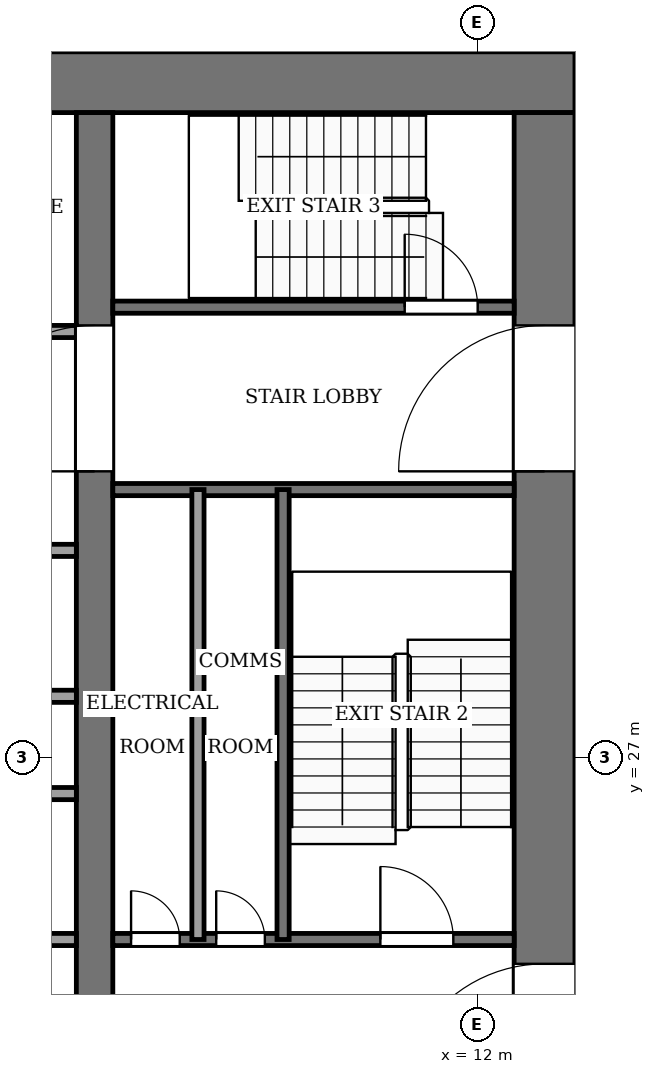
"""IFC4 building model, lengths in metres.
Left out: names, types, materials, properties, quantities, classifications, styles, units other than length and angle.
Written with IfcOpenShell. Run it as: python <this file> out.ifc"""

import sys

from ifc_helpers import new_model, si_unit, direction, frame, frame_2d, origin, place, context, subcontext, project, spatial, rectangle, extrude, element, fill, save


model = new_model("IFC4")
c1 = context("Model", 3, precision=1e-05, world=origin(), true_north=direction((0.0, 1.0)))
c2 = subcontext(c1, "Body", "Model", "MODEL_VIEW")
j1 = project(units=[si_unit("LENGTHUNIT", "METRE"), si_unit("PLANEANGLEUNIT", "RADIAN")], contexts=[c1])
p1 = place(None, origin())
s1 = spatial("IfcSite", under=j1, at=p1, CompositionType="ELEMENT")
p2 = place(p1, origin())
s2 = spatial("IfcBuilding", under=s1, at=p2, CompositionType="ELEMENT")
p3 = place(p2, frame((0.0, 0.0, 138.0)))
s3 = spatial("IfcBuildingStorey", under=s2, at=p3, CompositionType="ELEMENT", Elevation=138.0)
p4 = place(p3, frame((-13.6, 38.1, -0.13), z_axis=(0.0, 0.0, 1.0), x_axis=(1.0, 0.0, 0.0)))
e1 = element("IfcWall", 1, at=p4, inside=s3, PredefinedType="SHEAR", context=c2, shape_type="SweptSolid", body=[
    extrude(rectangle(XDim=27.2, YDim=1.0, at=frame_2d((13.6, 0.0))), origin(), (0.0, 0.0, 1.0), 4.0),
])
p5 = place(p3, frame((13.1, 18.4, -0.13), z_axis=(0.0, 0.0, 1.0), x_axis=(0.0, 1.0, 0.0)))
e2 = element("IfcWall", 2, at=p5, inside=s3, PredefinedType="SHEAR", context=c2, shape_type="SweptSolid", body=[
    extrude(rectangle(XDim=19.2, YDim=1.0, at=frame_2d((9.6, 0.0))), origin(), (0.0, 0.0, 1.0), 4.0),
])
p6 = place(p5, frame((2.8, 0.0, 0.13)))
e3 = element("IfcOpeningElement", 3, at=p6, cuts=e2, PredefinedType="OPENING", context=c2, shape_type="SweptSolid", body=[
    extrude(rectangle(XDim=2.4, YDim=2.4, at=frame_2d((1.2, 1.2))), frame((0.0, 0.51, 0.0), z_axis=(0.0, -1.0, 0.0), x_axis=(1.0, 0.0, 0.0)), (0.0, 0.0, 1.0), 1.02),
])
p7 = place(p5, frame((13.3, 0.0, 0.13)))
e4 = element("IfcOpeningElement", 4, at=p7, cuts=e2, PredefinedType="OPENING", context=c2, shape_type="SweptSolid", body=[
    extrude(rectangle(XDim=2.4, YDim=2.4, at=frame_2d((1.2, 1.2))), frame((0.0, 0.51, 0.0), z_axis=(0.0, -1.0, 0.0), x_axis=(1.0, 0.0, 0.0)), (0.0, 0.0, 1.0), 1.02),
])
p8 = place(p3, frame((5.7, 18.4, -0.13), z_axis=(0.0, 0.0, 1.0), x_axis=(0.0, 1.0, 0.0)))
e5 = element("IfcWall", 5, at=p8, inside=s3, PredefinedType="SHEAR", context=c2, shape_type="SweptSolid", body=[
    extrude(rectangle(XDim=19.2, YDim=0.6, at=frame_2d((9.6, 0.0))), origin(), (0.0, 0.0, 1.0), 4.0),
])
p9 = place(p8, frame((13.3, 0.0, 0.13)))
e6 = element("IfcOpeningElement", 6, at=p9, cuts=e5, PredefinedType="OPENING", context=c2, shape_type="SweptSolid", body=[
    extrude(rectangle(XDim=2.4, YDim=2.4, at=frame_2d((1.2, 1.2))), frame((0.0, 0.31, 0.0), z_axis=(0.0, -1.0, 0.0), x_axis=(1.0, 0.0, 0.0)), (0.0, 0.0, 1.0), 0.62),
])
p10 = place(p3, frame((-5.4, 24.0, 0.0), z_axis=(0.0, 0.0, 1.0), x_axis=(1.0, 0.0, 0.0)))
e7 = element("IfcWall", 7, at=p10, inside=s3, PredefinedType="PARTITIONING", context=c2, shape_type="SweptSolid", body=[
    extrude(rectangle(XDim=10.8, YDim=0.2, at=frame_2d((5.4, 0.0))), origin(), (0.0, 0.0, 1.0), 3.87),
])
p11 = place(p10, frame((0.75, 0.0, 0.0)))
e8 = element("IfcOpeningElement", 8, at=p11, cuts=e7, PredefinedType="OPENING", context=c2, shape_type="SweptSolid", body=[
    extrude(rectangle(XDim=1.2, YDim=2.2, at=frame_2d((0.6, 1.1))), frame((0.0, 0.11, 0.0), z_axis=(0.0, -1.0, 0.0), x_axis=(1.0, 0.0, 0.0)), (0.0, 0.0, 1.0), 0.22),
])
p12 = place(p10, frame((3.45, 0.0, 0.0)))
e9 = element("IfcOpeningElement", 9, at=p12, cuts=e7, PredefinedType="OPENING", context=c2, shape_type="SweptSolid", body=[
    extrude(rectangle(XDim=1.2, YDim=2.2, at=frame_2d((0.6, 1.1))), frame((0.0, 0.11, 0.0), z_axis=(0.0, -1.0, 0.0), x_axis=(1.0, 0.0, 0.0)), (0.0, 0.0, 1.0), 0.22),
])
p13 = place(p10, frame((6.15, 0.0, 0.0)))
e10 = element("IfcOpeningElement", 10, at=p13, cuts=e7, PredefinedType="OPENING", context=c2, shape_type="SweptSolid", body=[
    extrude(rectangle(XDim=1.2, YDim=2.2, at=frame_2d((0.6, 1.1))), frame((0.0, 0.11, 0.0), z_axis=(0.0, -1.0, 0.0), x_axis=(1.0, 0.0, 0.0)), (0.0, 0.0, 1.0), 0.22),
])
p14 = place(p10, frame((8.85, 0.0, 0.0)))
e11 = element("IfcOpeningElement", 11, at=p14, cuts=e7, PredefinedType="OPENING", context=c2, shape_type="SweptSolid", body=[
    extrude(rectangle(XDim=1.2, YDim=2.2, at=frame_2d((0.6, 1.1))), frame((0.0, 0.11, 0.0), z_axis=(0.0, -1.0, 0.0), x_axis=(1.0, 0.0, 0.0)), (0.0, 0.0, 1.0), 0.22),
])
p15 = place(p3, frame((6.0, 24.0, 0.0), z_axis=(0.0, 0.0, 1.0), x_axis=(1.0, 0.0, 0.0)))
e12 = element("IfcWall", 12, at=p15, inside=s3, PredefinedType="PARTITIONING", context=c2, shape_type="SweptSolid", body=[
    extrude(rectangle(XDim=6.6, YDim=0.2, at=frame_2d((3.3, 0.0))), origin(), (0.0, 0.0, 1.0), 3.87),
])
p16 = place(p15, frame((0.3, 0.0, 0.0)))
e13 = element("IfcOpeningElement", 13, at=p16, cuts=e12, PredefinedType="OPENING", context=c2, shape_type="SweptSolid", body=[
    extrude(rectangle(XDim=0.8, YDim=2.1, at=frame_2d((0.4, 1.05))), frame((0.0, 0.11, 0.0), z_axis=(0.0, -1.0, 0.0), x_axis=(1.0, 0.0, 0.0)), (0.0, 0.0, 1.0), 0.22),
])
p17 = place(p15, frame((1.7, 0.0, 0.0)))
e14 = element("IfcOpeningElement", 14, at=p17, cuts=e12, PredefinedType="OPENING", context=c2, shape_type="SweptSolid", body=[
    extrude(rectangle(XDim=0.8, YDim=2.1, at=frame_2d((0.4, 1.05))), frame((0.0, 0.11, 0.0), z_axis=(0.0, -1.0, 0.0), x_axis=(1.0, 0.0, 0.0)), (0.0, 0.0, 1.0), 0.22),
])
p18 = place(p15, frame((4.4, 0.0, 0.0)))
e15 = element("IfcOpeningElement", 15, at=p18, cuts=e12, PredefinedType="OPENING", context=c2, shape_type="SweptSolid", body=[
    extrude(rectangle(XDim=1.2, YDim=2.2, at=frame_2d((0.6, 1.1))), frame((0.0, 0.11, 0.0), z_axis=(0.0, -1.0, 0.0), x_axis=(1.0, 0.0, 0.0)), (0.0, 0.0, 1.0), 0.22),
])
for number, where, z_axis, x_axis in (
    (16, (-5.4, 26.4, 0.0), (0.0, 0.0, 1.0), (1.0, 0.0, 0.0)),
    (17, (-5.4, 28.0, 0.0), (0.0, 0.0, 1.0), (1.0, 0.0, 0.0)),
    (18, (-5.4, 30.4, 0.0), (0.0, 0.0, 1.0), (1.0, 0.0, 0.0)),
):
    element("IfcWall", number, at=place(p3, frame(where, z_axis=z_axis, x_axis=x_axis)), inside=s3, PredefinedType="PARTITIONING", context=c2, shape_type="SweptSolid", body=[
        extrude(rectangle(XDim=10.8, YDim=0.2, at=frame_2d((5.4, 0.0))), origin(), (0.0, 0.0, 1.0), 3.87),
    ])
p19 = place(p3, frame((6.0, 31.4, 0.0), z_axis=(0.0, 0.0, 1.0), x_axis=(1.0, 0.0, 0.0)))
e19 = element("IfcWall", 19, at=p19, inside=s3, PredefinedType="PARTITIONING", context=c2, shape_type="SweptSolid", body=[
    extrude(rectangle(XDim=6.6, YDim=0.2, at=frame_2d((3.3, 0.0))), origin(), (0.0, 0.0, 1.0), 3.87),
])
p20 = place(p3, frame((-5.4, 34.0, 0.0), z_axis=(0.0, 0.0, 1.0), x_axis=(1.0, 0.0, 0.0)))
e20 = element("IfcWall", 20, at=p20, inside=s3, PredefinedType="PARTITIONING", context=c2, shape_type="SweptSolid", body=[
    extrude(rectangle(XDim=10.8, YDim=0.2, at=frame_2d((5.4, 0.0))), origin(), (0.0, 0.0, 1.0), 3.87),
])
p21 = place(p20, frame((6.15, 0.0, 0.0)))
e21 = element("IfcOpeningElement", 21, at=p21, cuts=e20, PredefinedType="OPENING", context=c2, shape_type="SweptSolid", body=[
    extrude(rectangle(XDim=1.2, YDim=2.2, at=frame_2d((0.6, 1.1))), frame((0.0, 0.11, 0.0), z_axis=(0.0, -1.0, 0.0), x_axis=(1.0, 0.0, 0.0)), (0.0, 0.0, 1.0), 0.22),
])
p22 = place(p20, frame((8.95, 0.0, 0.0)))
e22 = element("IfcOpeningElement", 22, at=p22, cuts=e20, PredefinedType="OPENING", context=c2, shape_type="SweptSolid", body=[
    extrude(rectangle(XDim=1.0, YDim=2.1, at=frame_2d((0.5, 1.05))), frame((0.0, 0.11, 0.0), z_axis=(0.0, -1.0, 0.0), x_axis=(1.0, 0.0, 0.0)), (0.0, 0.0, 1.0), 0.22),
])
p23 = place(p3, frame((6.0, 34.4, 0.0), z_axis=(0.0, 0.0, 1.0), x_axis=(1.0, 0.0, 0.0)))
e23 = element("IfcWall", 23, at=p23, inside=s3, PredefinedType="PARTITIONING", context=c2, shape_type="SweptSolid", body=[
    extrude(rectangle(XDim=6.6, YDim=0.2, at=frame_2d((3.3, 0.0))), origin(), (0.0, 0.0, 1.0), 3.87),
])
p24 = place(p23, frame((4.8, 0.0, 0.0)))
e24 = element("IfcOpeningElement", 24, at=p24, cuts=e23, PredefinedType="OPENING", context=c2, shape_type="SweptSolid", body=[
    extrude(rectangle(XDim=1.2, YDim=2.2, at=frame_2d((0.6, 1.1))), frame((0.0, 0.11, 0.0), z_axis=(0.0, -1.0, 0.0), x_axis=(1.0, 0.0, 0.0)), (0.0, 0.0, 1.0), 0.22),
])
for number, where, z_axis, x_axis in (
    (25, (7.4, 24.0, 0.0), (0.0, 0.0, 1.0), (0.0, 1.0, 0.0)),
    (26, (8.8, 24.0, 0.0), (0.0, 0.0, 1.0), (0.0, 1.0, 0.0)),
):
    element("IfcWall", number, at=place(p3, frame(where, z_axis=z_axis, x_axis=x_axis)), inside=s3, PredefinedType="PARTITIONING", context=c2, shape_type="SweptSolid", body=[
        extrude(rectangle(XDim=7.4, YDim=0.2, at=frame_2d((3.7, 0.0))), origin(), (0.0, 0.0, 1.0), 3.87),
    ])
p25 = place(p16, origin())
e27 = element("IfcDoor", 27, at=p25, inside=s3, OperationType="SINGLE_SWING_RIGHT", PredefinedType="DOOR", context=c2, shape_type="SweptSolid", body=[
    extrude(rectangle(XDim=0.8, YDim=2.1, at=frame_2d((0.4, 1.05))), frame((0.0, 0.025, 0.0), z_axis=(0.0, -1.0, 0.0), x_axis=(1.0, 0.0, 0.0)), (0.0, 0.0, 1.0), 0.05),
])
fill(e13, e27)
p26 = place(p17, origin())
e28 = element("IfcDoor", 28, at=p26, inside=s3, OperationType="SINGLE_SWING_LEFT", PredefinedType="DOOR", context=c2, shape_type="SweptSolid", body=[
    extrude(rectangle(XDim=0.8, YDim=2.1, at=frame_2d((0.4, 1.05))), frame((0.0, 0.025, 0.0), z_axis=(0.0, -1.0, 0.0), x_axis=(1.0, 0.0, 0.0)), (0.0, 0.0, 1.0), 0.05),
])
fill(e14, e28)
p27 = place(p18, origin())
e29 = element("IfcDoor", 29, at=p27, inside=s3, OperationType="SINGLE_SWING_RIGHT", PredefinedType="DOOR", context=c2, shape_type="SweptSolid", body=[
    extrude(rectangle(XDim=1.2, YDim=2.2, at=frame_2d((0.6, 1.1))), frame((0.0, 0.025, 0.0), z_axis=(0.0, -1.0, 0.0), x_axis=(1.0, 0.0, 0.0)), (0.0, 0.0, 1.0), 0.05),
])
fill(e15, e29)
p28 = place(p24, origin())
e30 = element("IfcDoor", 30, at=p28, inside=s3, OperationType="SINGLE_SWING_LEFT", PredefinedType="DOOR", context=c2, shape_type="SweptSolid", body=[
    extrude(rectangle(XDim=1.2, YDim=2.2, at=frame_2d((0.6, 1.1))), frame((0.0, 0.025, 0.0), z_axis=(0.0, -1.0, 0.0), x_axis=(1.0, 0.0, 0.0)), (0.0, 0.0, 1.0), 0.05),
])
fill(e24, e30)
p29 = place(p9, origin())
e31 = element("IfcDoor", 31, at=p29, inside=s3, OperationType="DOUBLE_DOOR_SINGLE_SWING", PredefinedType="DOOR", context=c2, shape_type="SweptSolid", body=[
    extrude(rectangle(XDim=2.4, YDim=2.4, at=frame_2d((1.2, 1.2))), frame((0.0, 0.025, 0.0), z_axis=(0.0, -1.0, 0.0), x_axis=(1.0, 0.0, 0.0)), (0.0, 0.0, 1.0), 0.05),
])
fill(e6, e31)
p30 = place(p6, origin())
e32 = element("IfcDoor", 32, at=p30, inside=s3, OperationType="DOUBLE_DOOR_SINGLE_SWING", PredefinedType="DOOR", context=c2, shape_type="SweptSolid", body=[
    extrude(rectangle(XDim=2.4, YDim=2.4, at=frame_2d((1.2, 1.2))), frame((0.0, 0.025, 0.0), z_axis=(0.0, -1.0, 0.0), x_axis=(1.0, 0.0, 0.0)), (0.0, 0.0, 1.0), 0.05),
])
fill(e3, e32)
p31 = place(p7, origin())
e33 = element("IfcDoor", 33, at=p31, inside=s3, OperationType="DOUBLE_DOOR_SINGLE_SWING", PredefinedType="DOOR", context=c2, shape_type="SweptSolid", body=[
    extrude(rectangle(XDim=2.4, YDim=2.4, at=frame_2d((1.2, 1.2))), frame((0.0, 0.025, 0.0), z_axis=(0.0, -1.0, 0.0), x_axis=(1.0, 0.0, 0.0)), (0.0, 0.0, 1.0), 0.05),
])
fill(e4, e33)
save(model, sys.argv[1])
